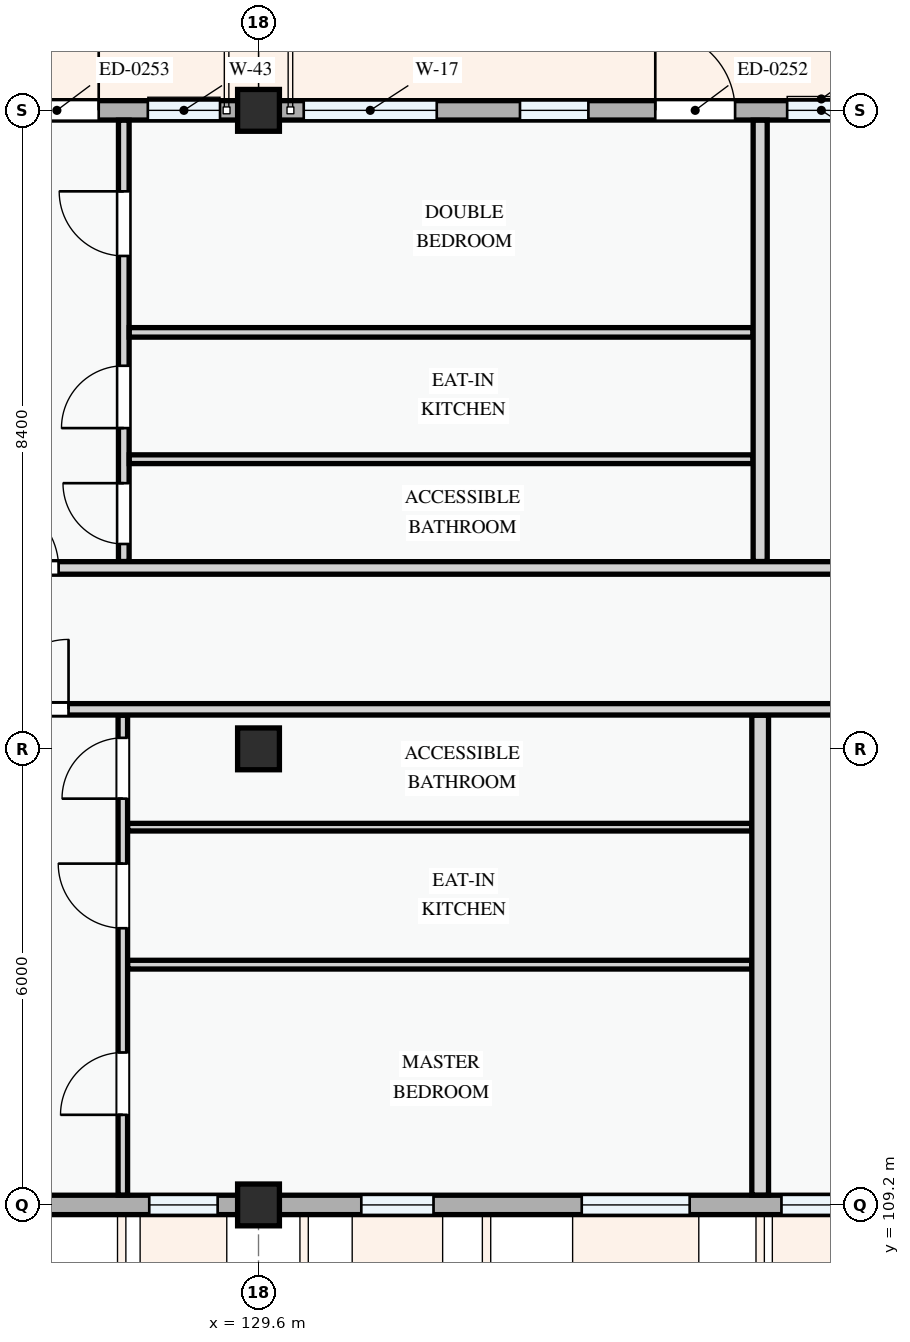
"""IFC4 building model, lengths in metres.
Left out: names, types, materials, properties, quantities, classifications, styles, units other than length and angle.
Written with IfcOpenShell. Run it as: python <this file> out.ifc"""

import sys

from ifc_helpers import new_model, si_unit, direction, frame, frame_2d, origin, origin_2d, place, context, subcontext, project, spatial, rectangle, extrude, element, fill, save


model = new_model("IFC4")
c1 = context("Model", 3, precision=1e-05, world=origin(), true_north=direction((0.0, 1.0)))
c2 = subcontext(c1, "Body", "Model", "MODEL_VIEW")
j1 = project(units=[si_unit("LENGTHUNIT", "METRE"), si_unit("PLANEANGLEUNIT", "RADIAN")], contexts=[c1])
p1 = place(None, origin())
s1 = spatial("IfcSite", under=j1, at=p1, CompositionType="ELEMENT")
p2 = place(p1, origin())
s2 = spatial("IfcBuilding", under=s1, at=p2, CompositionType="ELEMENT")
p3 = place(p2, frame((0.0, 0.0, 34.5)))
s3 = spatial("IfcBuildingStorey", under=s2, at=p3, CompositionType="ELEMENT", Elevation=34.5)
for number, where, z_axis, x_axis in (
    (1, (129.6, 109.2, 0.0), (0.0, 0.0, 1.0), (1.0, 0.0, 0.0)),
    (2, (129.6, 115.2, 0.0), (0.0, 0.0, 1.0), (1.0, 0.0, 0.0)),
    (3, (129.6, 123.6, 0.0), (0.0, 0.0, 1.0), (1.0, 0.0, 0.0)),
):
    element("IfcColumn", number, at=place(p3, frame(where, z_axis=z_axis, x_axis=x_axis)), inside=s3, PredefinedType="COLUMN", context=c2, shape_type="SweptSolid", body=[
        extrude(rectangle(XDim=0.55, YDim=0.55, at=origin_2d()), origin(), (0.0, 0.0, 1.0), 3.3),
    ])
p4 = place(p3, frame((138.0, 123.6, 0.0), z_axis=(0.0, 0.0, 1.0), x_axis=(-1.0, 0.0, 0.0)))
e4 = element("IfcWall", 4, at=p4, inside=s3, PredefinedType="STANDARD", context=c2, shape_type="SweptSolid", body=[
    extrude(rectangle(XDim=8.4, YDim=0.255, at=frame_2d((4.2, 0.0))), origin(), (0.0, 0.0, 1.0), 2.345),
])
p5 = place(p4, frame((2.13, 0.0, 0.0)))
e5 = element("IfcOpeningElement", 5, at=p5, cuts=e4, PredefinedType="OPENING", context=c2, shape_type="SweptSolid", body=[
    extrude(rectangle(XDim=1.05, YDim=2.15, at=frame_2d((0.525, 1.075))), frame((0.0, 0.137, 0.0), z_axis=(0.0, -1.0, 0.0), x_axis=(1.0, 0.0, 0.0)), (0.0, 0.0, 1.0), 0.275),
])
p6 = place(p4, frame((0.545, 0.0, 0.78)))
e6 = element("IfcOpeningElement", 6, at=p6, cuts=e4, PredefinedType="OPENING", context=c2, shape_type="SweptSolid", body=[
    extrude(rectangle(XDim=0.9, YDim=1.2, at=frame_2d((0.45, 0.6))), frame((0.0, 0.137, 0.0), z_axis=(0.0, -1.0, 0.0), x_axis=(1.0, 0.0, 0.0)), (0.0, 0.0, 1.0), 0.275),
])
p7 = place(p4, frame((4.06, 0.0, 0.78)))
e7 = element("IfcOpeningElement", 7, at=p7, cuts=e4, PredefinedType="OPENING", context=c2, shape_type="SweptSolid", body=[
    extrude(rectangle(XDim=0.9, YDim=1.2, at=frame_2d((0.45, 0.6))), frame((0.0, 0.137, 0.0), z_axis=(0.0, -1.0, 0.0), x_axis=(1.0, 0.0, 0.0)), (0.0, 0.0, 1.0), 0.275),
])
p8 = place(p4, frame((6.055, 0.0, 0.78)))
e8 = element("IfcOpeningElement", 8, at=p8, cuts=e4, PredefinedType="OPENING", context=c2, shape_type="SweptSolid", body=[
    extrude(rectangle(XDim=1.75, YDim=1.45, at=frame_2d((0.875, 0.725))), frame((0.0, 0.137, 0.0), z_axis=(0.0, -1.0, 0.0), x_axis=(1.0, 0.0, 0.0)), (0.0, 0.0, 1.0), 0.275),
])
p9 = place(p3, frame((129.6, 123.6, 0.0), z_axis=(0.0, 0.0, 1.0), x_axis=(-1.0, 0.0, 0.0)))
e9 = element("IfcWall", 9, at=p9, inside=s3, PredefinedType="STANDARD", context=c2, shape_type="SweptSolid", body=[
    extrude(rectangle(XDim=6.0, YDim=0.255, at=frame_2d((3.0, 0.0))), origin(), (0.0, 0.0, 1.0), 2.445),
])
p10 = place(p9, frame((2.102, 0.0, 0.0)))
e10 = element("IfcOpeningElement", 10, at=p10, cuts=e9, PredefinedType="OPENING", context=c2, shape_type="SweptSolid", body=[
    extrude(rectangle(XDim=1.1, YDim=2.15, at=frame_2d((0.55, 1.075))), frame((0.0, 0.137, 0.0), z_axis=(0.0, -1.0, 0.0), x_axis=(1.0, 0.0, 0.0)), (0.0, 0.0, 1.0), 0.275),
])
p11 = place(p9, frame((0.506, 0.0, 0.78)))
e11 = element("IfcOpeningElement", 11, at=p11, cuts=e9, PredefinedType="OPENING", context=c2, shape_type="SweptSolid", body=[
    extrude(rectangle(XDim=0.95, YDim=1.15, at=frame_2d((0.475, 0.575))), frame((0.0, 0.137, 0.0), z_axis=(0.0, -1.0, 0.0), x_axis=(1.0, 0.0, 0.0)), (0.0, 0.0, 1.0), 0.275),
])
p12 = place(p9, frame((3.756, 0.0, 0.78)))
e12 = element("IfcOpeningElement", 12, at=p12, cuts=e9, PredefinedType="OPENING", context=c2, shape_type="SweptSolid", body=[
    extrude(rectangle(XDim=1.55, YDim=1.4, at=frame_2d((0.775, 0.7))), frame((0.0, 0.137, 0.0), z_axis=(0.0, -1.0, 0.0), x_axis=(1.0, 0.0, 0.0)), (0.0, 0.0, 1.0), 0.275),
])
p13 = place(p3, frame((123.6, 109.2, 0.0), z_axis=(0.0, 0.0, 1.0), x_axis=(1.0, 0.0, 0.0)))
e13 = element("IfcWall", 13, at=p13, inside=s3, PredefinedType="STANDARD", context=c2, shape_type="SweptSolid", body=[
    extrude(rectangle(XDim=6.0, YDim=0.255, at=frame_2d((3.0, 0.0))), origin(), (0.0, 0.0, 1.0), 2.525),
])
p14 = place(p13, frame((1.577, 0.0, 0.78)))
e14 = element("IfcOpeningElement", 14, at=p14, cuts=e13, PredefinedType="OPENING", context=c2, shape_type="SweptSolid", body=[
    extrude(rectangle(XDim=1.25, YDim=1.45, at=frame_2d((0.625, 0.725))), frame((0.0, 0.137, 0.0), z_axis=(0.0, -1.0, 0.0), x_axis=(1.0, 0.0, 0.0)), (0.0, 0.0, 1.0), 0.275),
])
p15 = place(p13, frame((4.562, 0.0, 0.78)))
e15 = element("IfcOpeningElement", 15, at=p15, cuts=e13, PredefinedType="OPENING", context=c2, shape_type="SweptSolid", body=[
    extrude(rectangle(XDim=0.9, YDim=1.2, at=frame_2d((0.45, 0.6))), frame((0.0, 0.137, 0.0), z_axis=(0.0, -1.0, 0.0), x_axis=(1.0, 0.0, 0.0)), (0.0, 0.0, 1.0), 0.275),
])
p16 = place(p3, frame((129.6, 109.2, 0.0), z_axis=(0.0, 0.0, 1.0), x_axis=(1.0, 0.0, 0.0)))
e16 = element("IfcWall", 16, at=p16, inside=s3, PredefinedType="STANDARD", context=c2, shape_type="SweptSolid", body=[
    extrude(rectangle(XDim=8.4, YDim=0.255, at=frame_2d((4.2, 0.0))), origin(), (0.0, 0.0, 1.0), 2.375),
])
p17 = place(p16, frame((1.353, 0.0, 0.78)))
e17 = element("IfcOpeningElement", 17, at=p17, cuts=e16, PredefinedType="OPENING", context=c2, shape_type="SweptSolid", body=[
    extrude(rectangle(XDim=0.95, YDim=1.15, at=frame_2d((0.475, 0.575))), frame((0.0, 0.137, 0.0), z_axis=(0.0, -1.0, 0.0), x_axis=(1.0, 0.0, 0.0)), (0.0, 0.0, 1.0), 0.275),
])
p18 = place(p16, frame((4.252, 0.0, 0.78)))
e18 = element("IfcOpeningElement", 18, at=p18, cuts=e16, PredefinedType="OPENING", context=c2, shape_type="SweptSolid", body=[
    extrude(rectangle(XDim=1.42, YDim=1.38, at=frame_2d((0.71, 0.69))), frame((0.0, 0.137, 0.0), z_axis=(0.0, -1.0, 0.0), x_axis=(1.0, 0.0, 0.0)), (0.0, 0.0, 1.0), 0.275),
])
p19 = place(p16, frame((6.88, 0.0, 0.78)))
e19 = element("IfcOpeningElement", 19, at=p19, cuts=e16, PredefinedType="OPENING", context=c2, shape_type="SweptSolid", body=[
    extrude(rectangle(XDim=1.05, YDim=1.2, at=frame_2d((0.525, 0.6))), frame((0.0, 0.137, 0.0), z_axis=(0.0, -1.0, 0.0), x_axis=(1.0, 0.0, 0.0)), (0.0, 0.0, 1.0), 0.275),
])
p20 = place(p3, frame((127.815, 109.33, 0.0), z_axis=(0.0, 0.0, 1.0), x_axis=(0.0, 1.0, 0.0)))
e20 = element("IfcWall", 20, at=p20, inside=s3, PredefinedType="PARTITIONING", context=c2, shape_type="SweptSolid", body=[
    extrude(rectangle(XDim=6.313, YDim=0.125, at=frame_2d((3.157, 0.0))), origin(), (0.0, 0.0, 1.0), 3.0),
])
p21 = place(p20, frame((1.056, 0.0, 0.0)))
e21 = element("IfcOpeningElement", 21, at=p21, cuts=e20, PredefinedType="OPENING", context=c2, shape_type="SweptSolid", body=[
    extrude(rectangle(XDim=0.82, YDim=2.08, at=frame_2d((0.41, 1.04))), frame((0.0, 0.073, 0.0), z_axis=(0.0, -1.0, 0.0), x_axis=(1.0, 0.0, 0.0)), (0.0, 0.0, 1.0), 0.145),
])
p22 = place(p20, frame((3.511, 0.0, 0.0)))
e22 = element("IfcOpeningElement", 22, at=p22, cuts=e20, PredefinedType="OPENING", context=c2, shape_type="SweptSolid", body=[
    extrude(rectangle(XDim=0.85, YDim=2.1, at=frame_2d((0.425, 1.05))), frame((0.0, 0.073, 0.0), z_axis=(0.0, -1.0, 0.0), x_axis=(1.0, 0.0, 0.0)), (0.0, 0.0, 1.0), 0.145),
])
p23 = place(p20, frame((5.215, 0.0, 0.0)))
e23 = element("IfcOpeningElement", 23, at=p23, cuts=e20, PredefinedType="OPENING", context=c2, shape_type="SweptSolid", body=[
    extrude(rectangle(XDim=0.8, YDim=2.1, at=frame_2d((0.4, 1.05))), frame((0.0, 0.073, 0.0), z_axis=(0.0, -1.0, 0.0), x_axis=(1.0, 0.0, 0.0)), (0.0, 0.0, 1.0), 0.145),
])
p24 = place(p3, frame((127.879, 112.361, 0.0), z_axis=(0.0, 0.0, 1.0), x_axis=(1.0, 0.0, 0.0)))
e24 = element("IfcWall", 24, at=p24, inside=s3, PredefinedType="PARTITIONING", context=c2, shape_type="SweptSolid", body=[
    extrude(rectangle(XDim=8.208, YDim=0.115, at=frame_2d((4.104, 0.0))), origin(), (0.0, 0.0, 1.0), 3.0),
])
p25 = place(p3, frame((127.879, 114.17, 0.0), z_axis=(0.0, 0.0, 1.0), x_axis=(1.0, 0.0, 0.0)))
e25 = element("IfcWall", 25, at=p25, inside=s3, PredefinedType="PARTITIONING", context=c2, shape_type="SweptSolid", body=[
    extrude(rectangle(XDim=8.208, YDim=0.1, at=frame_2d((4.104, 0.0))), origin(), (0.0, 0.0, 1.0), 3.0),
])
p26 = place(p3, frame((127.828, 117.665, 0.0), z_axis=(0.0, 0.0, 1.0), x_axis=(0.0, 1.0, 0.0)))
e26 = element("IfcWall", 26, at=p26, inside=s3, PredefinedType="PARTITIONING", context=c2, shape_type="SweptSolid", body=[
    extrude(rectangle(XDim=5.806, YDim=0.14, at=frame_2d((2.903, 0.0))), origin(), (0.0, 0.0, 1.0), 3.0),
])
p27 = place(p26, frame((0.231, 0.0, 0.0)))
e27 = element("IfcOpeningElement", 27, at=p27, cuts=e26, PredefinedType="OPENING", context=c2, shape_type="SweptSolid", body=[
    extrude(rectangle(XDim=0.8, YDim=2.1, at=frame_2d((0.4, 1.05))), frame((0.0, 0.08, 0.0), z_axis=(0.0, -1.0, 0.0), x_axis=(1.0, 0.0, 0.0)), (0.0, 0.0, 1.0), 0.16),
])
p28 = place(p26, frame((1.755, 0.0, 0.0)))
e28 = element("IfcOpeningElement", 28, at=p28, cuts=e26, PredefinedType="OPENING", context=c2, shape_type="SweptSolid", body=[
    extrude(rectangle(XDim=0.82, YDim=2.08, at=frame_2d((0.41, 1.04))), frame((0.0, 0.08, 0.0), z_axis=(0.0, -1.0, 0.0), x_axis=(1.0, 0.0, 0.0)), (0.0, 0.0, 1.0), 0.16),
])
p29 = place(p26, frame((4.02, 0.0, 0.0)))
e29 = element("IfcOpeningElement", 29, at=p29, cuts=e26, PredefinedType="OPENING", context=c2, shape_type="SweptSolid", body=[
    extrude(rectangle(XDim=0.85, YDim=2.1, at=frame_2d((0.425, 1.05))), frame((0.0, 0.08, 0.0), z_axis=(0.0, -1.0, 0.0), x_axis=(1.0, 0.0, 0.0)), (0.0, 0.0, 1.0), 0.16),
])
p30 = place(p3, frame((127.9, 120.679, 0.0), z_axis=(0.0, 0.0, 1.0), x_axis=(1.0, 0.0, 0.0)))
e30 = element("IfcWall", 30, at=p30, inside=s3, PredefinedType="PARTITIONING", context=c2, shape_type="SweptSolid", body=[
    extrude(rectangle(XDim=8.206, YDim=0.125, at=frame_2d((4.103, 0.0))), origin(), (0.0, 0.0, 1.0), 3.0),
])
p31 = place(p3, frame((127.9, 119.01, 0.0), z_axis=(0.0, 0.0, 1.0), x_axis=(1.0, 0.0, 0.0)))
e31 = element("IfcWall", 31, at=p31, inside=s3, PredefinedType="PARTITIONING", context=c2, shape_type="SweptSolid", body=[
    extrude(rectangle(XDim=8.206, YDim=0.115, at=frame_2d((4.103, 0.0))), origin(), (0.0, 0.0, 1.0), 3.0),
])
p32 = place(p3, frame((136.2, 109.33, 0.0), z_axis=(0.0, 0.0, 1.0), x_axis=(0.0, 1.0, 0.0)))
e32 = element("IfcWall", 32, at=p32, inside=s3, PredefinedType="PARTITIONING", context=c2, shape_type="SweptSolid", body=[
    extrude(rectangle(XDim=6.313, YDim=0.22, at=frame_2d((3.157, 0.0))), origin(), (0.0, 0.0, 1.0), 3.0),
])
p33 = place(p3, frame((136.2, 117.665, 0.0), z_axis=(0.0, 0.0, 1.0), x_axis=(0.0, 1.0, 0.0)))
e33 = element("IfcWall", 33, at=p33, inside=s3, PredefinedType="PARTITIONING", context=c2, shape_type="SweptSolid", body=[
    extrude(rectangle(XDim=5.806, YDim=0.185, at=frame_2d((2.903, 0.0))), origin(), (0.0, 0.0, 1.0), 3.0),
])
p34 = place(p3, frame((109.33, 115.72, 0.0), z_axis=(0.0, 0.0, 1.0), x_axis=(1.0, 0.0, 0.0)))
e34 = element("IfcWall", 34, at=p34, inside=s3, PredefinedType="PARTITIONING", context=c2, shape_type="SweptSolid", body=[
    extrude(rectangle(XDim=40.72, YDim=0.15, at=frame_2d((20.36, 0.0))), origin(), (0.0, 0.0, 1.0), 3.0),
])
p35 = place(p34, frame((2.32, 0.0, 0.0)))
e35 = element("IfcOpeningElement", 35, at=p35, cuts=e34, PredefinedType="OPENING", context=c2, shape_type="SweptSolid", body=[
    extrude(rectangle(XDim=0.92, YDim=2.1, at=frame_2d((0.46, 1.05))), frame((0.0, 0.085, 0.0), z_axis=(0.0, -1.0, 0.0), x_axis=(1.0, 0.0, 0.0)), (0.0, 0.0, 1.0), 0.17),
])
p36 = place(p34, frame((16.851, 0.0, 0.0)))
e36 = element("IfcOpeningElement", 36, at=p36, cuts=e34, PredefinedType="OPENING", context=c2, shape_type="SweptSolid", body=[
    extrude(rectangle(XDim=0.92, YDim=2.1, at=frame_2d((0.46, 1.05))), frame((0.0, 0.085, 0.0), z_axis=(0.0, -1.0, 0.0), x_axis=(1.0, 0.0, 0.0)), (0.0, 0.0, 1.0), 0.17),
])
p37 = place(p34, frame((31.258, 0.0, 0.0)))
e37 = element("IfcOpeningElement", 37, at=p37, cuts=e34, PredefinedType="OPENING", context=c2, shape_type="SweptSolid", body=[
    extrude(rectangle(XDim=0.96, YDim=2.12, at=frame_2d((0.48, 1.06))), frame((0.0, 0.085, 0.0), z_axis=(0.0, -1.0, 0.0), x_axis=(1.0, 0.0, 0.0)), (0.0, 0.0, 1.0), 0.17),
])
p38 = place(p3, frame((109.33, 117.58, 0.0), z_axis=(0.0, 0.0, 1.0), x_axis=(1.0, 0.0, 0.0)))
e38 = element("IfcWall", 38, at=p38, inside=s3, PredefinedType="PARTITIONING", context=c2, shape_type="SweptSolid", body=[
    extrude(rectangle(XDim=43.21, YDim=0.165, at=frame_2d((21.605, 0.0))), origin(), (0.0, 0.0, 1.0), 3.0),
])
p39 = place(p38, frame((2.337, 0.0, 0.0)))
e39 = element("IfcOpeningElement", 39, at=p39, cuts=e38, PredefinedType="OPENING", context=c2, shape_type="SweptSolid", body=[
    extrude(rectangle(XDim=0.92, YDim=2.1, at=frame_2d((0.46, 1.05))), frame((0.0, 0.093, 0.0), z_axis=(0.0, -1.0, 0.0), x_axis=(1.0, 0.0, 0.0)), (0.0, 0.0, 1.0), 0.185),
])
p40 = place(p38, frame((16.721, 0.0, 0.0)))
e40 = element("IfcOpeningElement", 40, at=p40, cuts=e38, PredefinedType="OPENING", context=c2, shape_type="SweptSolid", body=[
    extrude(rectangle(XDim=0.92, YDim=2.1, at=frame_2d((0.46, 1.05))), frame((0.0, 0.093, 0.0), z_axis=(0.0, -1.0, 0.0), x_axis=(1.0, 0.0, 0.0)), (0.0, 0.0, 1.0), 0.185),
])
p41 = place(p38, frame((31.135, 0.0, 0.0)))
e41 = element("IfcOpeningElement", 41, at=p41, cuts=e38, PredefinedType="OPENING", context=c2, shape_type="SweptSolid", body=[
    extrude(rectangle(XDim=0.92, YDim=2.1, at=frame_2d((0.46, 1.05))), frame((0.0, 0.093, 0.0), z_axis=(0.0, -1.0, 0.0), x_axis=(1.0, 0.0, 0.0)), (0.0, 0.0, 1.0), 0.185),
])
p42 = place(p5, frame((1.05, 0.0, 0.0), z_axis=(0.0, 0.0, 1.0), x_axis=(-1.0, 0.0, 0.0)))
e42 = element("IfcDoor", 42, at=p42, inside=s3, OperationType="SINGLE_SWING_LEFT", PredefinedType="DOOR", context=c2, shape_type="SweptSolid", body=[
    extrude(rectangle(XDim=1.05, YDim=2.15, at=frame_2d((0.525, 1.075))), frame((0.0, 0.025, 0.0), z_axis=(0.0, -1.0, 0.0), x_axis=(1.0, 0.0, 0.0)), (0.0, 0.0, 1.0), 0.05),
])
fill(e5, e42)
p43 = place(p6, origin())
e43 = element("IfcWindow", 43, at=p43, inside=s3, PartitioningType="SINGLE_PANEL", PredefinedType="WINDOW", context=c2, shape_type="SweptSolid", body=[
    extrude(rectangle(XDim=0.9, YDim=1.2, at=frame_2d((0.45, 0.6))), frame((0.0, 0.03, 0.0), z_axis=(0.0, -1.0, 0.0), x_axis=(1.0, 0.0, 0.0)), (0.0, 0.0, 1.0), 0.06),
])
fill(e6, e43)
p44 = place(p7, origin())
e44 = element("IfcWindow", 44, at=p44, inside=s3, PartitioningType="SINGLE_PANEL", PredefinedType="WINDOW", context=c2, shape_type="SweptSolid", body=[
    extrude(rectangle(XDim=0.9, YDim=1.2, at=frame_2d((0.45, 0.6))), frame((0.0, 0.03, 0.0), z_axis=(0.0, -1.0, 0.0), x_axis=(1.0, 0.0, 0.0)), (0.0, 0.0, 1.0), 0.06),
])
fill(e7, e44)
p45 = place(p8, origin())
e45 = element("IfcWindow", 45, at=p45, inside=s3, PartitioningType="DOUBLE_PANEL_VERTICAL", PredefinedType="WINDOW", context=c2, shape_type="SweptSolid", body=[
    extrude(rectangle(XDim=1.75, YDim=1.45, at=frame_2d((0.875, 0.725))), frame((0.0, 0.03, 0.0), z_axis=(0.0, -1.0, 0.0), x_axis=(1.0, 0.0, 0.0)), (0.0, 0.0, 1.0), 0.06),
])
fill(e8, e45)
p46 = place(p10, frame((1.1, 0.0, 0.0), z_axis=(0.0, 0.0, 1.0), x_axis=(-1.0, 0.0, 0.0)))
e46 = element("IfcDoor", 46, at=p46, inside=s3, OperationType="SINGLE_SWING_RIGHT", PredefinedType="DOOR", context=c2, shape_type="SweptSolid", body=[
    extrude(rectangle(XDim=1.1, YDim=2.15, at=frame_2d((0.55, 1.075))), frame((0.0, 0.025, 0.0), z_axis=(0.0, -1.0, 0.0), x_axis=(1.0, 0.0, 0.0)), (0.0, 0.0, 1.0), 0.05),
])
fill(e10, e46)
p47 = place(p11, origin())
e47 = element("IfcWindow", 47, at=p47, inside=s3, PartitioningType="SINGLE_PANEL", PredefinedType="WINDOW", context=c2, shape_type="SweptSolid", body=[
    extrude(rectangle(XDim=0.95, YDim=1.15, at=frame_2d((0.475, 0.575))), frame((0.0, 0.03, 0.0), z_axis=(0.0, -1.0, 0.0), x_axis=(1.0, 0.0, 0.0)), (0.0, 0.0, 1.0), 0.06),
])
fill(e11, e47)
p48 = place(p15, origin())
e48 = element("IfcWindow", 48, at=p48, inside=s3, PartitioningType="SINGLE_PANEL", PredefinedType="WINDOW", context=c2, shape_type="SweptSolid", body=[
    extrude(rectangle(XDim=0.9, YDim=1.2, at=frame_2d((0.45, 0.6))), frame((0.0, 0.03, 0.0), z_axis=(0.0, -1.0, 0.0), x_axis=(1.0, 0.0, 0.0)), (0.0, 0.0, 1.0), 0.06),
])
fill(e15, e48)
p49 = place(p17, origin())
e49 = element("IfcWindow", 49, at=p49, inside=s3, PartitioningType="SINGLE_PANEL", PredefinedType="WINDOW", context=c2, shape_type="SweptSolid", body=[
    extrude(rectangle(XDim=0.95, YDim=1.15, at=frame_2d((0.475, 0.575))), frame((0.0, 0.03, 0.0), z_axis=(0.0, -1.0, 0.0), x_axis=(1.0, 0.0, 0.0)), (0.0, 0.0, 1.0), 0.06),
])
fill(e17, e49)
p50 = place(p18, origin())
e50 = element("IfcWindow", 50, at=p50, inside=s3, PartitioningType="SINGLE_PANEL", PredefinedType="WINDOW", context=c2, shape_type="SweptSolid", body=[
    extrude(rectangle(XDim=1.42, YDim=1.38, at=frame_2d((0.71, 0.69))), frame((0.0, 0.03, 0.0), z_axis=(0.0, -1.0, 0.0), x_axis=(1.0, 0.0, 0.0)), (0.0, 0.0, 1.0), 0.06),
])
fill(e18, e50)
p51 = place(p19, origin())
e51 = element("IfcWindow", 51, at=p51, inside=s3, PartitioningType="SINGLE_PANEL", PredefinedType="WINDOW", context=c2, shape_type="SweptSolid", body=[
    extrude(rectangle(XDim=1.05, YDim=1.2, at=frame_2d((0.525, 0.6))), frame((0.0, 0.03, 0.0), z_axis=(0.0, -1.0, 0.0), x_axis=(1.0, 0.0, 0.0)), (0.0, 0.0, 1.0), 0.06),
])
fill(e19, e51)
p52 = place(p21, origin())
e52 = element("IfcDoor", 52, at=p52, inside=s3, OperationType="SINGLE_SWING_LEFT", PredefinedType="DOOR", context=c2, shape_type="SweptSolid", body=[
    extrude(rectangle(XDim=0.82, YDim=2.08, at=frame_2d((0.41, 1.04))), frame((0.0, 0.025, 0.0), z_axis=(0.0, -1.0, 0.0), x_axis=(1.0, 0.0, 0.0)), (0.0, 0.0, 1.0), 0.05),
])
fill(e21, e52)
p53 = place(p22, origin())
e53 = element("IfcDoor", 53, at=p53, inside=s3, OperationType="SINGLE_SWING_RIGHT", PredefinedType="DOOR", context=c2, shape_type="SweptSolid", body=[
    extrude(rectangle(XDim=0.85, YDim=2.1, at=frame_2d((0.425, 1.05))), frame((0.0, 0.025, 0.0), z_axis=(0.0, -1.0, 0.0), x_axis=(1.0, 0.0, 0.0)), (0.0, 0.0, 1.0), 0.05),
])
fill(e22, e53)
p54 = place(p23, origin())
e54 = element("IfcDoor", 54, at=p54, inside=s3, OperationType="SINGLE_SWING_LEFT", PredefinedType="DOOR", context=c2, shape_type="SweptSolid", body=[
    extrude(rectangle(XDim=0.8, YDim=2.1, at=frame_2d((0.4, 1.05))), frame((0.0, 0.025, 0.0), z_axis=(0.0, -1.0, 0.0), x_axis=(1.0, 0.0, 0.0)), (0.0, 0.0, 1.0), 0.05),
])
fill(e23, e54)
p55 = place(p27, origin())
e55 = element("IfcDoor", 55, at=p55, inside=s3, OperationType="SINGLE_SWING_RIGHT", PredefinedType="DOOR", context=c2, shape_type="SweptSolid", body=[
    extrude(rectangle(XDim=0.8, YDim=2.1, at=frame_2d((0.4, 1.05))), frame((0.0, 0.025, 0.0), z_axis=(0.0, -1.0, 0.0), x_axis=(1.0, 0.0, 0.0)), (0.0, 0.0, 1.0), 0.05),
])
fill(e27, e55)
p56 = place(p28, origin())
e56 = element("IfcDoor", 56, at=p56, inside=s3, OperationType="SINGLE_SWING_LEFT", PredefinedType="DOOR", context=c2, shape_type="SweptSolid", body=[
    extrude(rectangle(XDim=0.82, YDim=2.08, at=frame_2d((0.41, 1.04))), frame((0.0, 0.025, 0.0), z_axis=(0.0, -1.0, 0.0), x_axis=(1.0, 0.0, 0.0)), (0.0, 0.0, 1.0), 0.05),
])
fill(e28, e56)
p57 = place(p29, origin())
e57 = element("IfcDoor", 57, at=p57, inside=s3, OperationType="SINGLE_SWING_RIGHT", PredefinedType="DOOR", context=c2, shape_type="SweptSolid", body=[
    extrude(rectangle(XDim=0.85, YDim=2.1, at=frame_2d((0.425, 1.05))), frame((0.0, 0.025, 0.0), z_axis=(0.0, -1.0, 0.0), x_axis=(1.0, 0.0, 0.0)), (0.0, 0.0, 1.0), 0.05),
])
fill(e29, e57)
p58 = place(p36, origin())
e58 = element("IfcDoor", 58, at=p58, inside=s3, OperationType="SINGLE_SWING_RIGHT", PredefinedType="DOOR", context=c2, shape_type="SweptSolid", body=[
    extrude(rectangle(XDim=0.92, YDim=2.1, at=frame_2d((0.46, 1.05))), frame((0.0, 0.025, 0.0), z_axis=(0.0, -1.0, 0.0), x_axis=(1.0, 0.0, 0.0)), (0.0, 0.0, 1.0), 0.05),
])
fill(e36, e58)
p59 = place(p40, origin())
e59 = element("IfcDoor", 59, at=p59, inside=s3, OperationType="SINGLE_SWING_LEFT", PredefinedType="DOOR", context=c2, shape_type="SweptSolid", body=[
    extrude(rectangle(XDim=0.92, YDim=2.1, at=frame_2d((0.46, 1.05))), frame((0.0, 0.025, 0.0), z_axis=(0.0, -1.0, 0.0), x_axis=(1.0, 0.0, 0.0)), (0.0, 0.0, 1.0), 0.05),
])
fill(e40, e59)
save(model, sys.argv[1])
